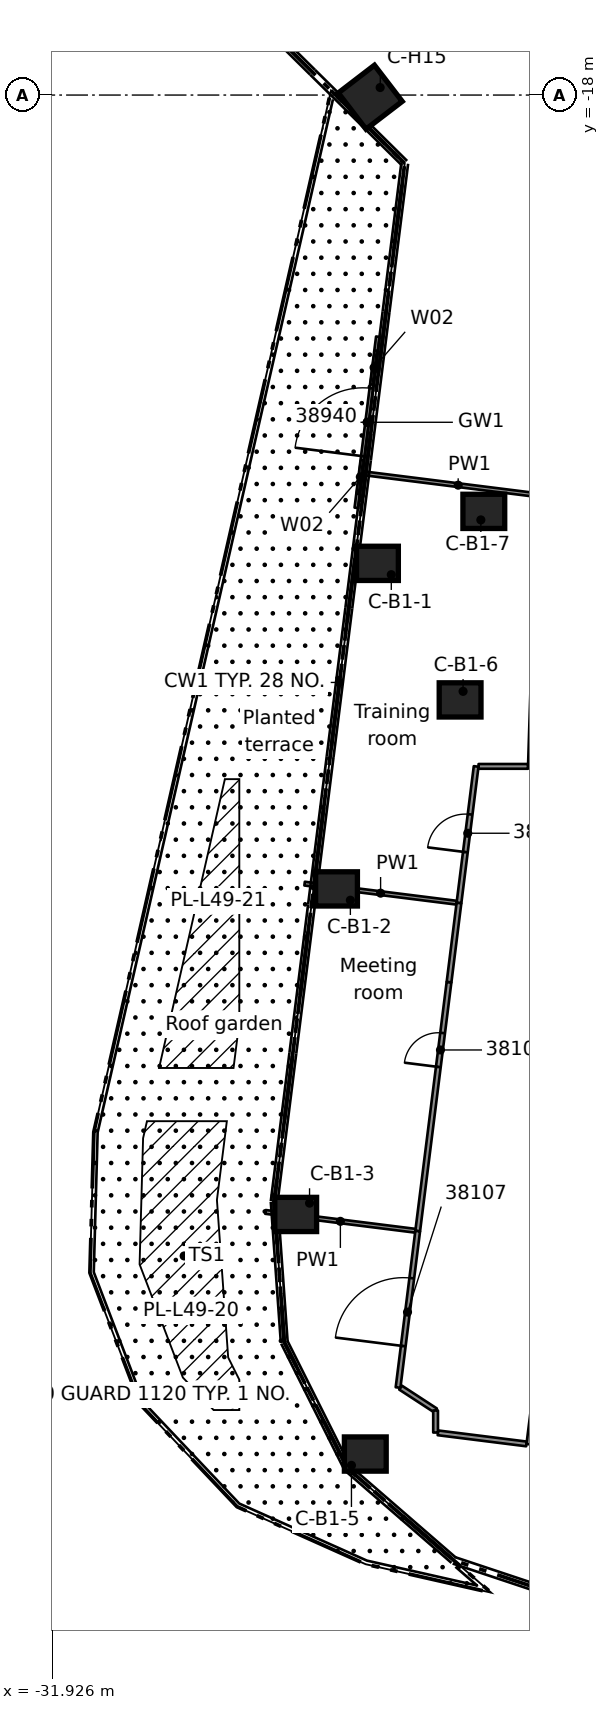
"""IFC4 building model, lengths in metres.
Left out: names, types, materials, properties, quantities, classifications, styles, units other than length and angle.
Written with IfcOpenShell. Run it as: python <this file> out.ifc"""

import sys

from ifc_helpers import new_model, si_unit, direction, frame, frame_2d, origin, origin_2d, place, context, subcontext, project, spatial, rectangle, extrude, element, fill, save


model = new_model("IFC4")
c1 = context("Model", 3, precision=1e-05, world=origin(), true_north=direction((0.0, 1.0)))
c2 = subcontext(c1, "Body", "Model", "MODEL_VIEW")
j1 = project(units=[si_unit("LENGTHUNIT", "METRE"), si_unit("PLANEANGLEUNIT", "RADIAN")], contexts=[c1])
p1 = place(None, origin())
s1 = spatial("IfcSite", under=j1, at=p1, CompositionType="ELEMENT")
p2 = place(p1, origin())
s2 = spatial("IfcBuilding", under=s1, at=p2, CompositionType="ELEMENT")
p3 = place(p2, frame((0.0, 0.0, 188.6)))
s3 = spatial("IfcBuildingStorey", under=s2, at=p3, CompositionType="ELEMENT", Elevation=188.6)
for number, where, z_axis, x_axis in (
    (1, (-23.365, -30.322, 0.0), (0.0, 0.0, 1.0), (1.0, 0.0, 0.0)),
    (2, (-24.442, -38.888, 0.0), (0.0, 0.0, 1.0), (1.0, 0.0, 0.0)),
    (3, (-25.516, -47.454, 0.0), (0.0, 0.0, 1.0), (1.0, 0.0, 0.0)),
    (4, (-23.685, -53.758, 0.0), (0.0, 0.0, 1.0), (1.0, 0.0, 0.0)),
    (5, (-21.19, -33.915, 0.0), (0.0, 0.0, 1.0), (1.0, 0.0, 0.0)),
    (6, (-20.566, -28.954, 0.0), (0.0, 0.0, 1.0), (1.0, 0.0, 0.0)),
):
    element("IfcColumn", number, at=place(p3, frame(where, z_axis=z_axis, x_axis=x_axis)), inside=s3, PredefinedType="COLUMN", context=c2, shape_type="SweptSolid", body=[
        extrude(rectangle(XDim=1.1, YDim=0.9, at=origin_2d()), origin(), (0.0, 0.0, 1.0), 3.5),
    ])
p4 = place(p3, frame((-23.555, -18.056, 0.0), z_axis=(0.0, 0.0, 1.0), x_axis=(-0.793650742501, -0.60837365075, 0.0)))
e7 = element("IfcColumn", 7, at=p4, inside=s3, PredefinedType="COLUMN", context=c2, shape_type="SweptSolid", body=[
    extrude(rectangle(XDim=1.2, YDim=1.2, at=origin_2d()), origin(), (0.0, 0.0, 1.0), 3.5),
])
p5 = place(p3, frame((-23.918, -28.862, 0.0), z_axis=(0.0, 0.0, 1.0), x_axis=(0.124796053311, 0.992182415223, 0.0)))
e8 = element("IfcWall", 8, at=p5, inside=s3, PredefinedType="STANDARD", context=c2, shape_type="SweptSolid", body=[
    extrude(rectangle(XDim=4.539, YDim=0.1, at=frame_2d((2.269, 0.0))), origin(), (0.0, 0.0, 1.0), 3.08),
])
p6 = place(p5, frame((1.37, 0.0, 0.0)))
e9 = element("IfcOpeningElement", 9, at=p6, cuts=e8, PredefinedType="OPENING", context=c2, shape_type="SweptSolid", body=[
    extrude(rectangle(XDim=1.8, YDim=2.4, at=frame_2d((0.9, 1.2))), frame((0.0, 0.06, 0.0), z_axis=(0.0, -1.0, 0.0), x_axis=(1.0, 0.0, 0.0)), (0.0, 0.0, 1.0), 0.12),
])
p7 = place(p5, frame((0.37, 0.0, 0.0)))
e10 = element("IfcOpeningElement", 10, at=p7, cuts=e8, PredefinedType="OPENING", context=c2, shape_type="SweptSolid", body=[
    extrude(rectangle(XDim=0.9, YDim=2.4, at=frame_2d((0.45, 1.2))), frame((0.0, 0.06, 0.0), z_axis=(0.0, -1.0, 0.0), x_axis=(1.0, 0.0, 0.0)), (0.0, 0.0, 1.0), 0.12),
])
p8 = place(p5, frame((3.27, 0.0, 0.0)))
e11 = element("IfcOpeningElement", 11, at=p8, cuts=e8, PredefinedType="OPENING", context=c2, shape_type="SweptSolid", body=[
    extrude(rectangle(XDim=0.9, YDim=2.4, at=frame_2d((0.45, 1.2))), frame((0.0, 0.06, 0.0), z_axis=(0.0, -1.0, 0.0), x_axis=(1.0, 0.0, 0.0)), (0.0, 0.0, 1.0), 0.12),
])
p9 = place(p3, frame((-21.773, -53.2, 0.0), z_axis=(0.0, 0.0, 1.0), x_axis=(0.992231399055, -0.124405991537, 0.0)))
e12 = element("IfcWall", 12, at=p9, inside=s3, PredefinedType="PARTITIONING", context=c2, shape_type="SweptSolid", body=[
    extrude(rectangle(XDim=2.347, YDim=0.125, at=frame_2d((1.174, 0.0))), origin(), (0.0, 0.0, 1.0), 3.06),
])
p10 = place(p3, frame((-26.313, -47.387, 0.0), z_axis=(0.0, 0.0, 1.0), x_axis=(0.992185976099, -0.124767739553, 0.0)))
e13 = element("IfcWall", 13, at=p10, inside=s3, PredefinedType="PARTITIONING", context=c2, shape_type="SweptSolid", body=[
    extrude(rectangle(XDim=3.976, YDim=0.1, at=frame_2d((1.988, 0.0))), origin(), (0.0, 0.0, 1.0), 3.06),
])
p11 = place(p3, frame((-25.282, -38.749, 0.0), z_axis=(0.0, 0.0, 1.0), x_axis=(0.992218133557, -0.124511748205, 0.0)))
e14 = element("IfcWall", 14, at=p11, inside=s3, PredefinedType="PARTITIONING", context=c2, shape_type="SweptSolid", body=[
    extrude(rectangle(XDim=4.031, YDim=0.1, at=frame_2d((2.016, 0.0))), origin(), (0.0, 0.0, 1.0), 3.06),
])
p12 = place(p3, frame((-23.703, -27.955, 0.0), z_axis=(0.0, 0.0, 1.0), x_axis=(0.992195935575, -0.124688513617, 0.0)))
e15 = element("IfcWall", 15, at=p12, inside=s3, PredefinedType="PARTITIONING", context=c2, shape_type="SweptSolid", body=[
    extrude(rectangle(XDim=4.964, YDim=0.1, at=frame_2d((2.482, 0.0))), origin(), (0.0, 0.0, 1.0), 3.06),
])
p13 = place(p3, frame((-22.759, -52.009, 0.0), z_axis=(0.0, 0.0, 1.0), x_axis=(0.837456505501, -0.546503981133, 0.0)))
e16 = element("IfcWall", 16, at=p13, inside=s3, PredefinedType="PARTITIONING", context=c2, shape_type="SweptSolid", body=[
    extrude(rectangle(XDim=1.104, YDim=0.125, at=frame_2d((0.552, 0.0))), origin(), (0.0, 0.0, 1.0), 3.06),
])
p14 = place(p3, frame((-20.704, -35.664, 0.0), z_axis=(0.0, 0.0, 1.0), x_axis=(1.0, 0.0, 0.0)))
e17 = element("IfcWall", 17, at=p14, inside=s3, PredefinedType="PARTITIONING", context=c2, shape_type="SweptSolid", body=[
    extrude(rectangle(XDim=1.302, YDim=0.125, at=frame_2d((0.651, 0.0))), origin(), (0.0, 0.0, 1.0), 3.06),
])
p15 = place(p3, frame((-19.183, -30.708, 0.0), z_axis=(0.0, 0.0, 1.0), x_axis=(-0.031658999126, -0.99949872825, 0.0)))
e18 = element("IfcWall", 18, at=p15, inside=s3, PredefinedType="PARTITIONING", context=c2, shape_type="SweptSolid", body=[
    extrude(rectangle(XDim=4.958, YDim=0.125, at=frame_2d((2.479, 0.0))), origin(), (0.0, 0.0, 1.0), 3.06),
])
p16 = place(p3, frame((-19.381, -53.5, 0.0), z_axis=(0.0, 0.0, 1.0), x_axis=(0.124661325918, 0.992199351854, 0.0)))
e19 = element("IfcWall", 19, at=p16, inside=s3, PredefinedType="PARTITIONING", context=c2, shape_type="SweptSolid", body=[
    extrude(rectangle(XDim=8.2, YDim=0.125, at=frame_2d((4.1, 0.0))), origin(), (0.0, 0.0, 1.0), 3.06),
])
p17 = place(p3, frame((-22.306, -47.891, 0.0), z_axis=(0.0, 0.0, 1.0), x_axis=(0.124831339058, 0.992177976368, 0.0)))
e20 = element("IfcWall", 20, at=p17, inside=s3, PredefinedType="PARTITIONING", context=c2, shape_type="SweptSolid", body=[
    extrude(rectangle(XDim=6.601, YDim=0.125, at=frame_2d((3.3, 0.0))), origin(), (0.0, 0.0, 1.0), 3.06),
])
p18 = place(p17, frame((4.353, 0.0, 0.0)))
e21 = element("IfcOpeningElement", 21, at=p18, cuts=e20, PredefinedType="OPENING", context=c2, shape_type="SweptSolid", body=[
    extrude(rectangle(XDim=0.9, YDim=2.1, at=frame_2d((0.45, 1.05))), frame((0.0, 0.073, 0.0), z_axis=(0.0, -1.0, 0.0), x_axis=(1.0, 0.0, 0.0)), (0.0, 0.0, 1.0), 0.145),
])
p19 = place(p3, frame((-21.22, -39.259, 0.0), z_axis=(0.0, 0.0, 1.0), x_axis=(0.12478977457, 0.992183204939, 0.0)))
e22 = element("IfcWall", 22, at=p19, inside=s3, PredefinedType="PARTITIONING", context=c2, shape_type="SweptSolid", body=[
    extrude(rectangle(XDim=3.621, YDim=0.125, at=frame_2d((1.811, 0.0))), origin(), (0.0, 0.0, 1.0), 3.06),
])
p20 = place(p19, frame((1.35, 0.0, 0.0)))
e23 = element("IfcOpeningElement", 23, at=p20, cuts=e22, PredefinedType="OPENING", context=c2, shape_type="SweptSolid", body=[
    extrude(rectangle(XDim=1.0, YDim=2.1, at=frame_2d((0.5, 1.05))), frame((0.0, 0.073, 0.0), z_axis=(0.0, -1.0, 0.0), x_axis=(1.0, 0.0, 0.0)), (0.0, 0.0, 1.0), 0.145),
])
p21 = place(p3, frame((-22.823, -52.008, 0.0), z_axis=(0.0, 0.0, 1.0), x_axis=(0.12462129386, 0.992204380718, 0.0)))
e24 = element("IfcWall", 24, at=p21, inside=s3, PredefinedType="PARTITIONING", context=c2, shape_type="SweptSolid", body=[
    extrude(rectangle(XDim=4.149, YDim=0.125, at=frame_2d((2.075, 0.0))), origin(), (0.0, 0.0, 1.0), 3.06),
])
p22 = place(p21, frame((1.1, 0.0, 0.0)))
e25 = element("IfcOpeningElement", 25, at=p22, cuts=e24, PredefinedType="OPENING", context=c2, shape_type="SweptSolid", body=[
    extrude(rectangle(XDim=1.8, YDim=2.1, at=frame_2d((0.9, 1.05))), frame((0.0, 0.073, 0.0), z_axis=(0.0, -1.0, 0.0), x_axis=(1.0, 0.0, 0.0)), (0.0, 0.0, 1.0), 0.145),
])
p23 = place(p3, frame((-21.481, -41.34, 0.0), z_axis=(0.0, 0.0, 1.0), x_axis=(0.124435870528, 0.992227652369, 0.0)))
e26 = element("IfcWall", 26, at=p23, inside=s3, PredefinedType="PARTITIONING", context=c2, shape_type="SweptSolid", body=[
    extrude(rectangle(XDim=2.097, YDim=0.125, at=frame_2d((1.049, 0.0))), origin(), (0.0, 0.0, 1.0), 3.06),
])
p24 = place(p3, frame((-21.835, -53.192, 0.0), z_axis=(0.0, 0.0, 1.0), x_axis=(0.0, 1.0, 0.0)))
e27 = element("IfcWall", 27, at=p24, inside=s3, PredefinedType="PARTITIONING", context=c2, shape_type="SweptSolid", body=[
    extrude(rectangle(XDim=0.58, YDim=0.125, at=frame_2d((0.29, 0.0))), origin(), (0.0, 0.0, 1.0), 3.06),
])
p25 = place(p6, origin())
e28 = element("IfcDoor", 28, at=p25, inside=s3, OperationType="DOUBLE_DOOR_SINGLE_SWING", PredefinedType="DOOR", context=c2, shape_type="SweptSolid", body=[
    extrude(rectangle(XDim=1.8, YDim=2.4, at=frame_2d((0.9, 1.2))), frame((0.0, 0.025, 0.0), z_axis=(0.0, -1.0, 0.0), x_axis=(1.0, 0.0, 0.0)), (0.0, 0.0, 1.0), 0.05),
])
fill(e9, e28)
p26 = place(p7, origin())
e29 = element("IfcWindow", 29, at=p26, inside=s3, PartitioningType="SINGLE_PANEL", PredefinedType="WINDOW", context=c2, shape_type="SweptSolid", body=[
    extrude(rectangle(XDim=0.9, YDim=2.4, at=frame_2d((0.45, 1.2))), frame((0.0, 0.03, 0.0), z_axis=(0.0, -1.0, 0.0), x_axis=(1.0, 0.0, 0.0)), (0.0, 0.0, 1.0), 0.06),
])
fill(e10, e29)
p27 = place(p8, origin())
e30 = element("IfcWindow", 30, at=p27, inside=s3, PartitioningType="SINGLE_PANEL", PredefinedType="WINDOW", context=c2, shape_type="SweptSolid", body=[
    extrude(rectangle(XDim=0.9, YDim=2.4, at=frame_2d((0.45, 1.2))), frame((0.0, 0.03, 0.0), z_axis=(0.0, -1.0, 0.0), x_axis=(1.0, 0.0, 0.0)), (0.0, 0.0, 1.0), 0.06),
])
fill(e11, e30)
p28 = place(p22, origin())
e31 = element("IfcDoor", 31, at=p28, inside=s3, OperationType="DOUBLE_DOOR_SINGLE_SWING", PredefinedType="DOOR", context=c2, shape_type="SweptSolid", body=[
    extrude(rectangle(XDim=1.8, YDim=2.1, at=frame_2d((0.9, 1.05))), frame((0.0, 0.025, 0.0), z_axis=(0.0, -1.0, 0.0), x_axis=(1.0, 0.0, 0.0)), (0.0, 0.0, 1.0), 0.05),
])
fill(e25, e31)
p29 = place(p20, origin())
e32 = element("IfcDoor", 32, at=p29, inside=s3, OperationType="SINGLE_SWING_RIGHT", PredefinedType="DOOR", context=c2, shape_type="SweptSolid", body=[
    extrude(rectangle(XDim=1.0, YDim=2.1, at=frame_2d((0.5, 1.05))), frame((0.0, 0.025, 0.0), z_axis=(0.0, -1.0, 0.0), x_axis=(1.0, 0.0, 0.0)), (0.0, 0.0, 1.0), 0.05),
])
fill(e23, e32)
p30 = place(p18, origin())
e33 = element("IfcDoor", 33, at=p30, inside=s3, OperationType="SINGLE_SWING_RIGHT", PredefinedType="DOOR", context=c2, shape_type="SweptSolid", body=[
    extrude(rectangle(XDim=0.9, YDim=2.1, at=frame_2d((0.45, 1.05))), frame((0.0, 0.025, 0.0), z_axis=(0.0, -1.0, 0.0), x_axis=(1.0, 0.0, 0.0)), (0.0, 0.0, 1.0), 0.05),
])
fill(e21, e33)
save(model, sys.argv[1])
